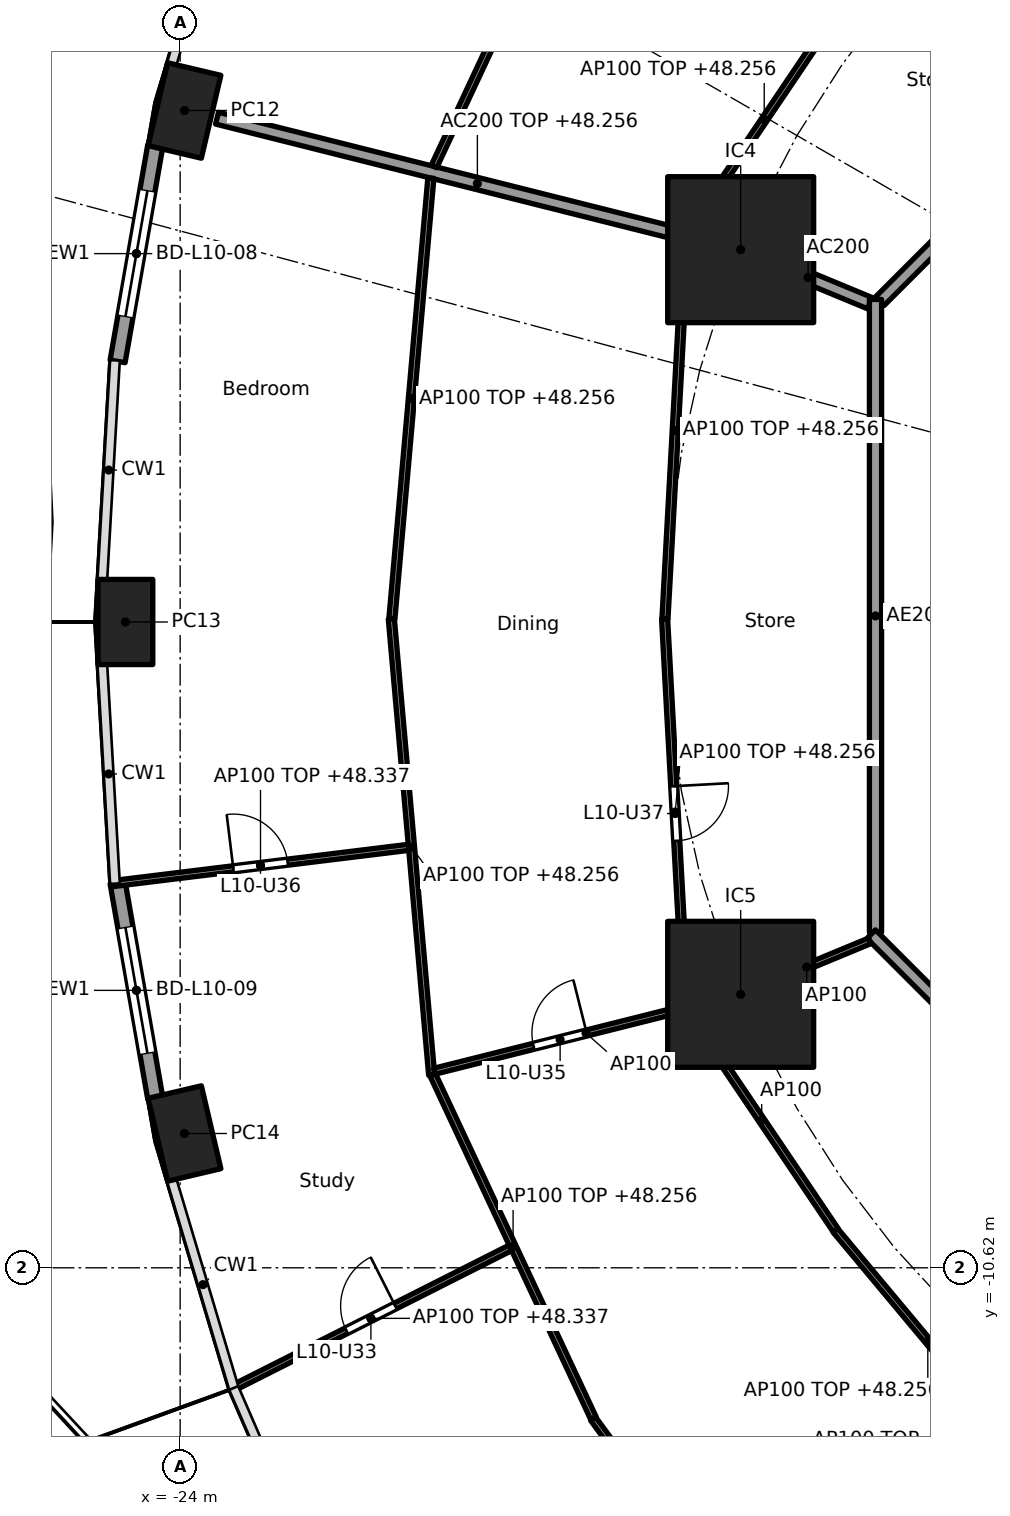
"""IFC4 building model, lengths in metres.
Left out: names, types, materials, properties, quantities, classifications, styles, units other than length and angle.
Written with IfcOpenShell. Run it as: python <this file> out.ifc"""

import sys

from ifc_helpers import new_model, si_unit, direction, frame, frame_2d, origin, origin_2d, place, context, subcontext, project, spatial, rectangle, hollow_rectangle, extrude, element, fill, save


model = new_model("IFC4")
c1 = context("Model", 3, precision=1e-05, world=origin(), true_north=direction((0.0, 1.0)))
c2 = subcontext(c1, "Body", "Model", "MODEL_VIEW")
j1 = project(units=[si_unit("LENGTHUNIT", "METRE"), si_unit("PLANEANGLEUNIT", "RADIAN")], contexts=[c1])
p1 = place(None, origin())
s1 = spatial("IfcSite", under=j1, at=p1, CompositionType="ELEMENT")
p2 = place(p1, origin())
s2 = spatial("IfcBuilding", under=s1, at=p2, CompositionType="ELEMENT")
p3 = place(p2, frame((0.0, 0.0, 45.5)))
s3 = spatial("IfcBuildingStorey", under=s2, at=p3, CompositionType="ELEMENT", Elevation=45.5)
for number, where, z_axis, x_axis in (
    (1, (-23.929, 8.412, 0.0), (0.0, 0.0, 1.0), (-0.229, -0.973, 0.0)),
    (2, (-24.9, 0.0, 0.0), (0.0, 0.0, 1.0), (0.0, -1.0, 0.0)),
    (3, (-23.929, -8.412, 0.0), (0.0, 0.0, 1.0), (0.229, -0.973, 0.0)),
):
    element("IfcColumn", number, at=place(p3, frame(where, z_axis=z_axis, x_axis=x_axis)), inside=s3, PredefinedType="COLUMN", context=c2, shape_type="SweptSolid", body=[
        extrude(hollow_rectangle(XDim=1.4, YDim=0.9, WallThickness=0.05, at=origin_2d()), origin(), (0.0, 0.0, 1.0), 3.7),
    ])
for number, where, z_axis, x_axis in (
    (4, (-14.782, 6.123, 0.0), (0.0, 0.0, 1.0), (1.0, 0.0, 0.0)),
    (5, (-14.782, -6.123, 0.0), (0.0, 0.0, 1.0), (1.0, 0.0, 0.0)),
):
    element("IfcColumn", number, at=place(p3, frame(where, z_axis=z_axis, x_axis=x_axis)), inside=s3, PredefinedType="COLUMN", context=c2, shape_type="SweptSolid", body=[
        extrude(rectangle(XDim=2.4, YDim=2.4, at=origin_2d()), origin(), (0.0, 0.0, 1.0), 3.7),
    ])
p4 = place(p3, frame((-25.029, 4.286, 0.0), z_axis=(0.0, 0.0, 1.0), x_axis=(0.172217377323, 0.98505897029, 0.0)))
e6 = element("IfcWall", 6, at=p4, inside=s3, PredefinedType="SOLIDWALL", context=c2, shape_type="SweptSolid", body=[
    extrude(rectangle(XDim=3.598, YDim=0.25, at=frame_2d((1.799, 0.0))), origin(), (0.0, 0.0, 1.0), 3.44),
])
p5 = place(p4, frame((0.749, 0.0, 0.0)))
e7 = element("IfcOpeningElement", 7, at=p5, cuts=e6, PredefinedType="OPENING", context=c2, shape_type="SweptSolid", body=[
    extrude(rectangle(XDim=2.1, YDim=2.4, at=frame_2d((1.05, 1.2))), frame((0.0, 0.135, 0.0), z_axis=(0.0, -1.0, 0.0), x_axis=(1.0, 0.0, 0.0)), (0.0, 0.0, 1.0), 0.27),
])
p6 = place(p3, frame((-24.409, -7.83, 0.0), z_axis=(0.0, 0.0, 1.0), x_axis=(-0.172217377323, 0.98505897029, 0.0)))
e8 = element("IfcWall", 8, at=p6, inside=s3, PredefinedType="SOLIDWALL", context=c2, shape_type="SweptSolid", body=[
    extrude(rectangle(XDim=3.598, YDim=0.25, at=frame_2d((1.799, 0.0))), origin(), (0.0, 0.0, 1.0), 3.44),
])
p7 = place(p6, frame((0.749, 0.0, 0.0)))
e9 = element("IfcOpeningElement", 9, at=p7, cuts=e8, PredefinedType="OPENING", context=c2, shape_type="SweptSolid", body=[
    extrude(rectangle(XDim=2.1, YDim=2.4, at=frame_2d((1.05, 1.2))), frame((0.0, 0.135, 0.0), z_axis=(0.0, -1.0, 0.0), x_axis=(1.0, 0.0, 0.0)), (0.0, 0.0, 1.0), 0.27),
])
p8 = place(p3, frame((-12.657, 5.243, 0.0), z_axis=(0.0, 0.0, 1.0), x_axis=(-0.923885664896, 0.382668627144, 0.0)))
e10 = element("IfcWall", 10, at=p8, inside=s3, PredefinedType="PARTITIONING", context=c2, shape_type="SweptSolid", body=[
    extrude(rectangle(XDim=2.2, YDim=0.2, at=frame_2d((1.1, 0.0))), origin(), (0.0, 0.0, 1.0), 3.44),
])
p9 = place(p3, frame((-14.831, 6.135, 0.0), z_axis=(0.0, 0.0, 1.0), x_axis=(-0.969884949569, 0.243563512454, 0.0)))
e11 = element("IfcWall", 11, at=p9, inside=s3, PredefinedType="PARTITIONING", context=c2, shape_type="SweptSolid", body=[
    extrude(rectangle(XDim=8.829, YDim=0.2, at=frame_2d((4.415, 0.0))), origin(), (0.0, 0.0, 1.0), 2.756),
])
p10 = place(p3, frame((-5.275, 12.494, 0.0), z_axis=(0.0, 0.0, 1.0), x_axis=(-0.707106781187, -0.707106781187, 0.0)))
e12 = element("IfcWall", 12, at=p10, inside=s3, PredefinedType="PARTITIONING", context=c2, shape_type="SweptSolid", body=[
    extrude(rectangle(XDim=10.209, YDim=0.2, at=frame_2d((5.104, 0.0))), origin(), (0.0, 0.0, 1.0), 3.44),
])
p11 = place(p10, frame((2.87, 0.0, 0.0)))
e13 = element("IfcOpeningElement", 13, at=p11, cuts=e12, PredefinedType="OPENING", context=c2, shape_type="SweptSolid", body=[
    extrude(rectangle(XDim=1.0, YDim=2.1, at=frame_2d((0.5, 1.05))), frame((0.0, 0.11, 0.0), z_axis=(0.0, -1.0, 0.0), x_axis=(1.0, 0.0, 0.0)), (0.0, 0.0, 1.0), 0.22),
])
p12 = place(p3, frame((-12.565, 5.304, 0.0), z_axis=(0.0, 0.0, 1.0), x_axis=(0.0, -1.0, 0.0)))
e14 = element("IfcWall", 14, at=p12, inside=s3, PredefinedType="PARTITIONING", context=c2, shape_type="SweptSolid", body=[
    extrude(rectangle(XDim=10.409, YDim=0.2, at=frame_2d((5.205, 0.0))), origin(), (0.0, 0.0, 1.0), 3.44),
])
p13 = place(p3, frame((-12.635, -5.134, 0.0), z_axis=(0.0, 0.0, 1.0), x_axis=(0.707106781187, -0.707106781187, 0.0)))
e15 = element("IfcWall", 15, at=p13, inside=s3, PredefinedType="PARTITIONING", context=c2, shape_type="SweptSolid", body=[
    extrude(rectangle(XDim=10.609, YDim=0.2, at=frame_2d((5.305, 0.0))), origin(), (0.0, 0.0, 1.0), 3.44),
])
p14 = place(p3, frame((-8.953, 8.958, 0.0), z_axis=(0.0, 0.0, 1.0), x_axis=(-0.684574307023, 0.728943082939, 0.0)))
e16 = element("IfcWall", 16, at=p14, inside=s3, PredefinedType="PARTITIONING", context=c2, shape_type="SweptSolid", body=[
    extrude(rectangle(XDim=15.231, YDim=0.1, at=frame_2d((7.615, 0.0))), origin(), (0.0, 0.0, 1.0), 2.687),
])
p15 = place(p14, frame((1.54, 0.0, 0.0)))
e17 = element("IfcOpeningElement", 17, at=p15, cuts=e16, PredefinedType="OPENING", context=c2, shape_type="SweptSolid", body=[
    extrude(rectangle(XDim=0.9, YDim=2.1, at=frame_2d((0.45, 1.05))), frame((0.0, 0.06, 0.0), z_axis=(0.0, -1.0, 0.0), x_axis=(1.0, 0.0, 0.0)), (0.0, 0.0, 1.0), 0.12),
])
p16 = place(p14, frame((6.174, 0.0, 0.0)))
e18 = element("IfcOpeningElement", 18, at=p16, cuts=e16, PredefinedType="OPENING", context=c2, shape_type="SweptSolid", body=[
    extrude(rectangle(XDim=0.9, YDim=2.1, at=frame_2d((0.45, 1.05))), frame((0.0, 0.06, 0.0), z_axis=(0.0, -1.0, 0.0), x_axis=(1.0, 0.0, 0.0)), (0.0, 0.0, 1.0), 0.12),
])
p17 = place(p14, frame((11.8, 0.0, 0.0)))
e19 = element("IfcOpeningElement", 19, at=p17, cuts=e16, PredefinedType="OPENING", context=c2, shape_type="SweptSolid", body=[
    extrude(rectangle(XDim=0.9, YDim=2.1, at=frame_2d((0.45, 1.05))), frame((0.0, 0.06, 0.0), z_axis=(0.0, -1.0, 0.0), x_axis=(1.0, 0.0, 0.0)), (0.0, 0.0, 1.0), 0.12),
])
p18 = place(p3, frame((-13.162, 10.087, 0.0), z_axis=(0.0, 0.0, 1.0), x_axis=(-0.55912750241, -0.829081682375, 0.0)))
e20 = element("IfcWall", 20, at=p18, inside=s3, PredefinedType="PARTITIONING", context=c2, shape_type="SweptSolid", body=[
    extrude(rectangle(XDim=4.408, YDim=0.1, at=frame_2d((2.204, 0.0))), origin(), (0.0, 0.0, 1.0), 2.756),
])
p19 = place(p3, frame((-17.203, 13.095, 0.0), z_axis=(0.0, 0.0, 1.0), x_axis=(-0.423926333401, -0.905696673202, 0.0)))
e21 = element("IfcWall", 21, at=p19, inside=s3, PredefinedType="PARTITIONING", context=c2, shape_type="SweptSolid", body=[
    extrude(rectangle(XDim=6.188, YDim=0.1, at=frame_2d((3.094, 0.0))), origin(), (0.0, 0.0, 1.0), 2.756),
])
p20 = place(p3, frame((-15.688, 6.249, 0.0), z_axis=(0.0, 0.0, 1.0), x_axis=(-0.054659814056, -0.998505034903, 0.0)))
e22 = element("IfcWall", 22, at=p20, inside=s3, PredefinedType="PARTITIONING", context=c2, shape_type="SweptSolid", body=[
    extrude(rectangle(XDim=6.208, YDim=0.1, at=frame_2d((3.104, 0.0))), origin(), (0.0, 0.0, 1.0), 2.756),
])
p21 = place(p3, frame((-19.877, 7.301, 0.0), z_axis=(0.0, 0.0, 1.0), x_axis=(-0.088143415068, -0.996107794558, 0.0)))
e23 = element("IfcWall", 23, at=p21, inside=s3, PredefinedType="PARTITIONING", context=c2, shape_type="SweptSolid", body=[
    extrude(rectangle(XDim=7.279, YDim=0.1, at=frame_2d((3.64, 0.0))), origin(), (0.0, 0.0, 1.0), 2.756),
])
p22 = place(p3, frame((-16.033, 0.05, 0.0), z_axis=(0.0, 0.0, 1.0), x_axis=(0.054634315779, -0.998506430395, 0.0)))
e24 = element("IfcWall", 24, at=p22, inside=s3, PredefinedType="PARTITIONING", context=c2, shape_type="SweptSolid", body=[
    extrude(rectangle(XDim=6.359, YDim=0.1, at=frame_2d((3.179, 0.0))), origin(), (0.0, 0.0, 1.0), 2.756),
])
p23 = place(p22, frame((2.754, 0.0, 0.0)))
e25 = element("IfcOpeningElement", 25, at=p23, cuts=e24, PredefinedType="OPENING", context=c2, shape_type="SweptSolid", body=[
    extrude(rectangle(XDim=0.9, YDim=2.1, at=frame_2d((0.45, 1.05))), frame((0.0, 0.06, 0.0), z_axis=(0.0, -1.0, 0.0), x_axis=(1.0, 0.0, 0.0)), (0.0, 0.0, 1.0), 0.12),
])
p24 = place(p3, frame((-20.527, 0.05, 0.0), z_axis=(0.0, 0.0, 1.0), x_axis=(0.088135127406, -0.996108527881, 0.0)))
e26 = element("IfcWall", 26, at=p24, inside=s3, PredefinedType="PARTITIONING", context=c2, shape_type="SweptSolid", body=[
    extrude(rectangle(XDim=7.529, YDim=0.1, at=frame_2d((3.765, 0.0))), origin(), (0.0, 0.0, 1.0), 2.756),
])
p25 = place(p3, frame((-20.245, -3.706, 0.0), z_axis=(0.0, 0.0, 1.0), x_axis=(-0.992575966227, -0.121626277047, 0.0)))
e27 = element("IfcWall", 27, at=p25, inside=s3, PredefinedType="PARTITIONING", context=c2, shape_type="SweptSolid", body=[
    extrude(rectangle(XDim=4.904, YDim=0.1, at=frame_2d((2.452, 0.0))), origin(), (0.0, 0.0, 1.0), 2.837),
])
p26 = place(p25, frame((2.002, 0.0, 0.0)))
e28 = element("IfcOpeningElement", 28, at=p26, cuts=e27, PredefinedType="OPENING", context=c2, shape_type="SweptSolid", body=[
    extrude(rectangle(XDim=0.9, YDim=2.1, at=frame_2d((0.45, 1.05))), frame((0.0, 0.06, 0.0), z_axis=(0.0, -1.0, 0.0), x_axis=(1.0, 0.0, 0.0)), (0.0, 0.0, 1.0), 0.12),
])
p27 = place(p3, frame((-12.657, -5.243, 0.0), z_axis=(0.0, 0.0, 1.0), x_axis=(-0.923864733477, -0.382719158442, 0.0)))
e29 = element("IfcWall", 29, at=p27, inside=s3, PredefinedType="PARTITIONING", context=c2, shape_type="SweptSolid", body=[
    extrude(rectangle(XDim=2.25, YDim=0.1, at=frame_2d((1.125, 0.0))), origin(), (0.0, 0.0, 1.0), 3.44),
])
p28 = place(p3, frame((-14.831, -6.135, 0.0), z_axis=(0.0, 0.0, 1.0), x_axis=(-0.96988230015, -0.243574062362, 0.0)))
e30 = element("IfcWall", 30, at=p28, inside=s3, PredefinedType="PARTITIONING", context=c2, shape_type="SweptSolid", body=[
    extrude(rectangle(XDim=5.144, YDim=0.1, at=frame_2d((2.572, 0.0))), origin(), (0.0, 0.0, 1.0), 3.44),
])
p29 = place(p28, frame((2.561, 0.0, 0.0)))
e31 = element("IfcOpeningElement", 31, at=p29, cuts=e30, PredefinedType="OPENING", context=c2, shape_type="SweptSolid", body=[
    extrude(rectangle(XDim=0.9, YDim=2.1, at=frame_2d((0.45, 1.05))), frame((0.0, 0.06, 0.0), z_axis=(0.0, -1.0, 0.0), x_axis=(1.0, 0.0, 0.0)), (0.0, 0.0, 1.0), 0.12),
])
p30 = place(p3, frame((-15.655, -6.391, 0.0), z_axis=(0.0, 0.0, 1.0), x_axis=(0.559126445155, -0.82908239538, 0.0)))
e32 = element("IfcWall", 32, at=p30, inside=s3, PredefinedType="PARTITIONING", context=c2, shape_type="SweptSolid", body=[
    extrude(rectangle(XDim=4.358, YDim=0.1, at=frame_2d((2.179, 0.0))), origin(), (0.0, 0.0, 1.0), 3.44),
])
p31 = place(p3, frame((-19.847, -7.445, 0.0), z_axis=(0.0, 0.0, 1.0), x_axis=(0.423892287987, -0.905712607942, 0.0)))
e33 = element("IfcWall", 33, at=p31, inside=s3, PredefinedType="PARTITIONING", context=c2, shape_type="SweptSolid", body=[
    extrude(rectangle(XDim=6.238, YDim=0.1, at=frame_2d((3.119, 0.0))), origin(), (0.0, 0.0, 1.0), 2.756),
])
p32 = place(p3, frame((-18.569, -10.292, 0.0), z_axis=(0.0, 0.0, 1.0), x_axis=(-0.892519131357, -0.451009534446, 0.0)))
e34 = element("IfcWall", 34, at=p32, inside=s3, PredefinedType="PARTITIONING", context=c2, shape_type="SweptSolid", body=[
    extrude(rectangle(XDim=5.14, YDim=0.1, at=frame_2d((2.57, 0.0))), origin(), (0.0, 0.0, 1.0), 2.837),
])
p33 = place(p32, frame((2.12, 0.0, 0.0)))
e35 = element("IfcOpeningElement", 35, at=p33, cuts=e34, PredefinedType="OPENING", context=c2, shape_type="SweptSolid", body=[
    extrude(rectangle(XDim=0.9, YDim=2.1, at=frame_2d((0.45, 1.05))), frame((0.0, 0.06, 0.0), z_axis=(0.0, -1.0, 0.0), x_axis=(1.0, 0.0, 0.0)), (0.0, 0.0, 1.0), 0.12),
])
p34 = place(p3, frame((-13.222, -10.007, 0.0), z_axis=(0.0, 0.0, 1.0), x_axis=(0.640807748916, -0.767701393075, 0.0)))
e36 = element("IfcWall", 36, at=p34, inside=s3, PredefinedType="PARTITIONING", context=c2, shape_type="SweptSolid", body=[
    extrude(rectangle(XDim=4.737, YDim=0.1, at=frame_2d((2.368, 0.0))), origin(), (0.0, 0.0, 1.0), 2.756),
])
p35 = place(p3, frame((-17.211, -13.1, 0.0), z_axis=(0.0, 0.0, 1.0), x_axis=(0.591206785834, -0.806520016109, 0.0)))
e37 = element("IfcWall", 37, at=p35, inside=s3, PredefinedType="PARTITIONING", context=c2, shape_type="SweptSolid", body=[
    extrude(rectangle(XDim=6.41, YDim=0.1, at=frame_2d((3.205, 0.0))), origin(), (0.0, 0.0, 1.0), 2.756),
])
p36 = place(p3, frame((-7.715, -10.193, 0.0), z_axis=(0.0, 0.0, 1.0), x_axis=(-0.573126502256, -0.819466907454, 0.0)))
e38 = element("IfcWall", 38, at=p36, inside=s3, PredefinedType="PARTITIONING", context=c2, shape_type="SweptSolid", body=[
    extrude(rectangle(XDim=9.954, YDim=0.1, at=frame_2d((4.977, 0.0))), origin(), (0.0, 0.0, 1.0), 2.687),
])
p37 = place(p36, frame((6.631, 0.0, 0.0)))
e39 = element("IfcOpeningElement", 39, at=p37, cuts=e38, PredefinedType="OPENING", context=c2, shape_type="SweptSolid", body=[
    extrude(rectangle(XDim=0.9, YDim=2.1, at=frame_2d((0.45, 1.05))), frame((0.0, 0.06, 0.0), z_axis=(0.0, -1.0, 0.0), x_axis=(1.0, 0.0, 0.0)), (0.0, 0.0, 1.0), 0.12),
])
p38 = place(p36, frame((1.678, 0.0, 0.0)))
e40 = element("IfcOpeningElement", 40, at=p38, cuts=e38, PredefinedType="OPENING", context=c2, shape_type="SweptSolid", body=[
    extrude(rectangle(XDim=0.9, YDim=2.1, at=frame_2d((0.45, 1.05))), frame((0.0, 0.06, 0.0), z_axis=(0.0, -1.0, 0.0), x_axis=(1.0, 0.0, 0.0)), (0.0, 0.0, 1.0), 0.12),
])
p39 = place(p5, origin())
e41 = element("IfcDoor", 41, at=p39, inside=s3, OperationType="SLIDING_TO_LEFT", PredefinedType="DOOR", context=c2, shape_type="SweptSolid", body=[
    extrude(rectangle(XDim=2.1, YDim=2.4, at=frame_2d((1.05, 1.2))), frame((0.0, 0.025, 0.0), z_axis=(0.0, -1.0, 0.0), x_axis=(1.0, 0.0, 0.0)), (0.0, 0.0, 1.0), 0.05),
])
fill(e7, e41)
p40 = place(p7, origin())
e42 = element("IfcDoor", 42, at=p40, inside=s3, OperationType="SLIDING_TO_LEFT", PredefinedType="DOOR", context=c2, shape_type="SweptSolid", body=[
    extrude(rectangle(XDim=2.1, YDim=2.4, at=frame_2d((1.05, 1.2))), frame((0.0, 0.025, 0.0), z_axis=(0.0, -1.0, 0.0), x_axis=(1.0, 0.0, 0.0)), (0.0, 0.0, 1.0), 0.05),
])
fill(e9, e42)
p41 = place(p33, frame((0.9, 0.0, 0.0), x_axis=(-1.0, 0.0, 0.0)))
e43 = element("IfcDoor", 43, at=p41, inside=s3, OperationType="SINGLE_SWING_RIGHT", PredefinedType="DOOR", context=c2, shape_type="SweptSolid", body=[
    extrude(rectangle(XDim=0.9, YDim=2.1, at=frame_2d((0.45, 1.05))), frame((0.0, 0.025, 0.0), z_axis=(0.0, -1.0, 0.0), x_axis=(1.0, 0.0, 0.0)), (0.0, 0.0, 1.0), 0.05),
])
fill(e35, e43)
p42 = place(p29, frame((0.9, 0.0, 0.0), x_axis=(-1.0, 0.0, 0.0)))
e44 = element("IfcDoor", 44, at=p42, inside=s3, OperationType="SINGLE_SWING_RIGHT", PredefinedType="DOOR", context=c2, shape_type="SweptSolid", body=[
    extrude(rectangle(XDim=0.9, YDim=2.1, at=frame_2d((0.45, 1.05))), frame((0.0, 0.025, 0.0), z_axis=(0.0, -1.0, 0.0), x_axis=(1.0, 0.0, 0.0)), (0.0, 0.0, 1.0), 0.05),
])
fill(e31, e44)
p43 = place(p26, frame((0.9, 0.0, 0.0), x_axis=(-1.0, 0.0, 0.0)))
e45 = element("IfcDoor", 45, at=p43, inside=s3, OperationType="SINGLE_SWING_LEFT", PredefinedType="DOOR", context=c2, shape_type="SweptSolid", body=[
    extrude(rectangle(XDim=0.9, YDim=2.1, at=frame_2d((0.45, 1.05))), frame((0.0, 0.025, 0.0), z_axis=(0.0, -1.0, 0.0), x_axis=(1.0, 0.0, 0.0)), (0.0, 0.0, 1.0), 0.05),
])
fill(e28, e45)
p44 = place(p23, origin())
e46 = element("IfcDoor", 46, at=p44, inside=s3, OperationType="SINGLE_SWING_LEFT", PredefinedType="DOOR", context=c2, shape_type="SweptSolid", body=[
    extrude(rectangle(XDim=0.9, YDim=2.1, at=frame_2d((0.45, 1.05))), frame((0.0, 0.025, 0.0), z_axis=(0.0, -1.0, 0.0), x_axis=(1.0, 0.0, 0.0)), (0.0, 0.0, 1.0), 0.05),
])
fill(e25, e46)
save(model, sys.argv[1])
